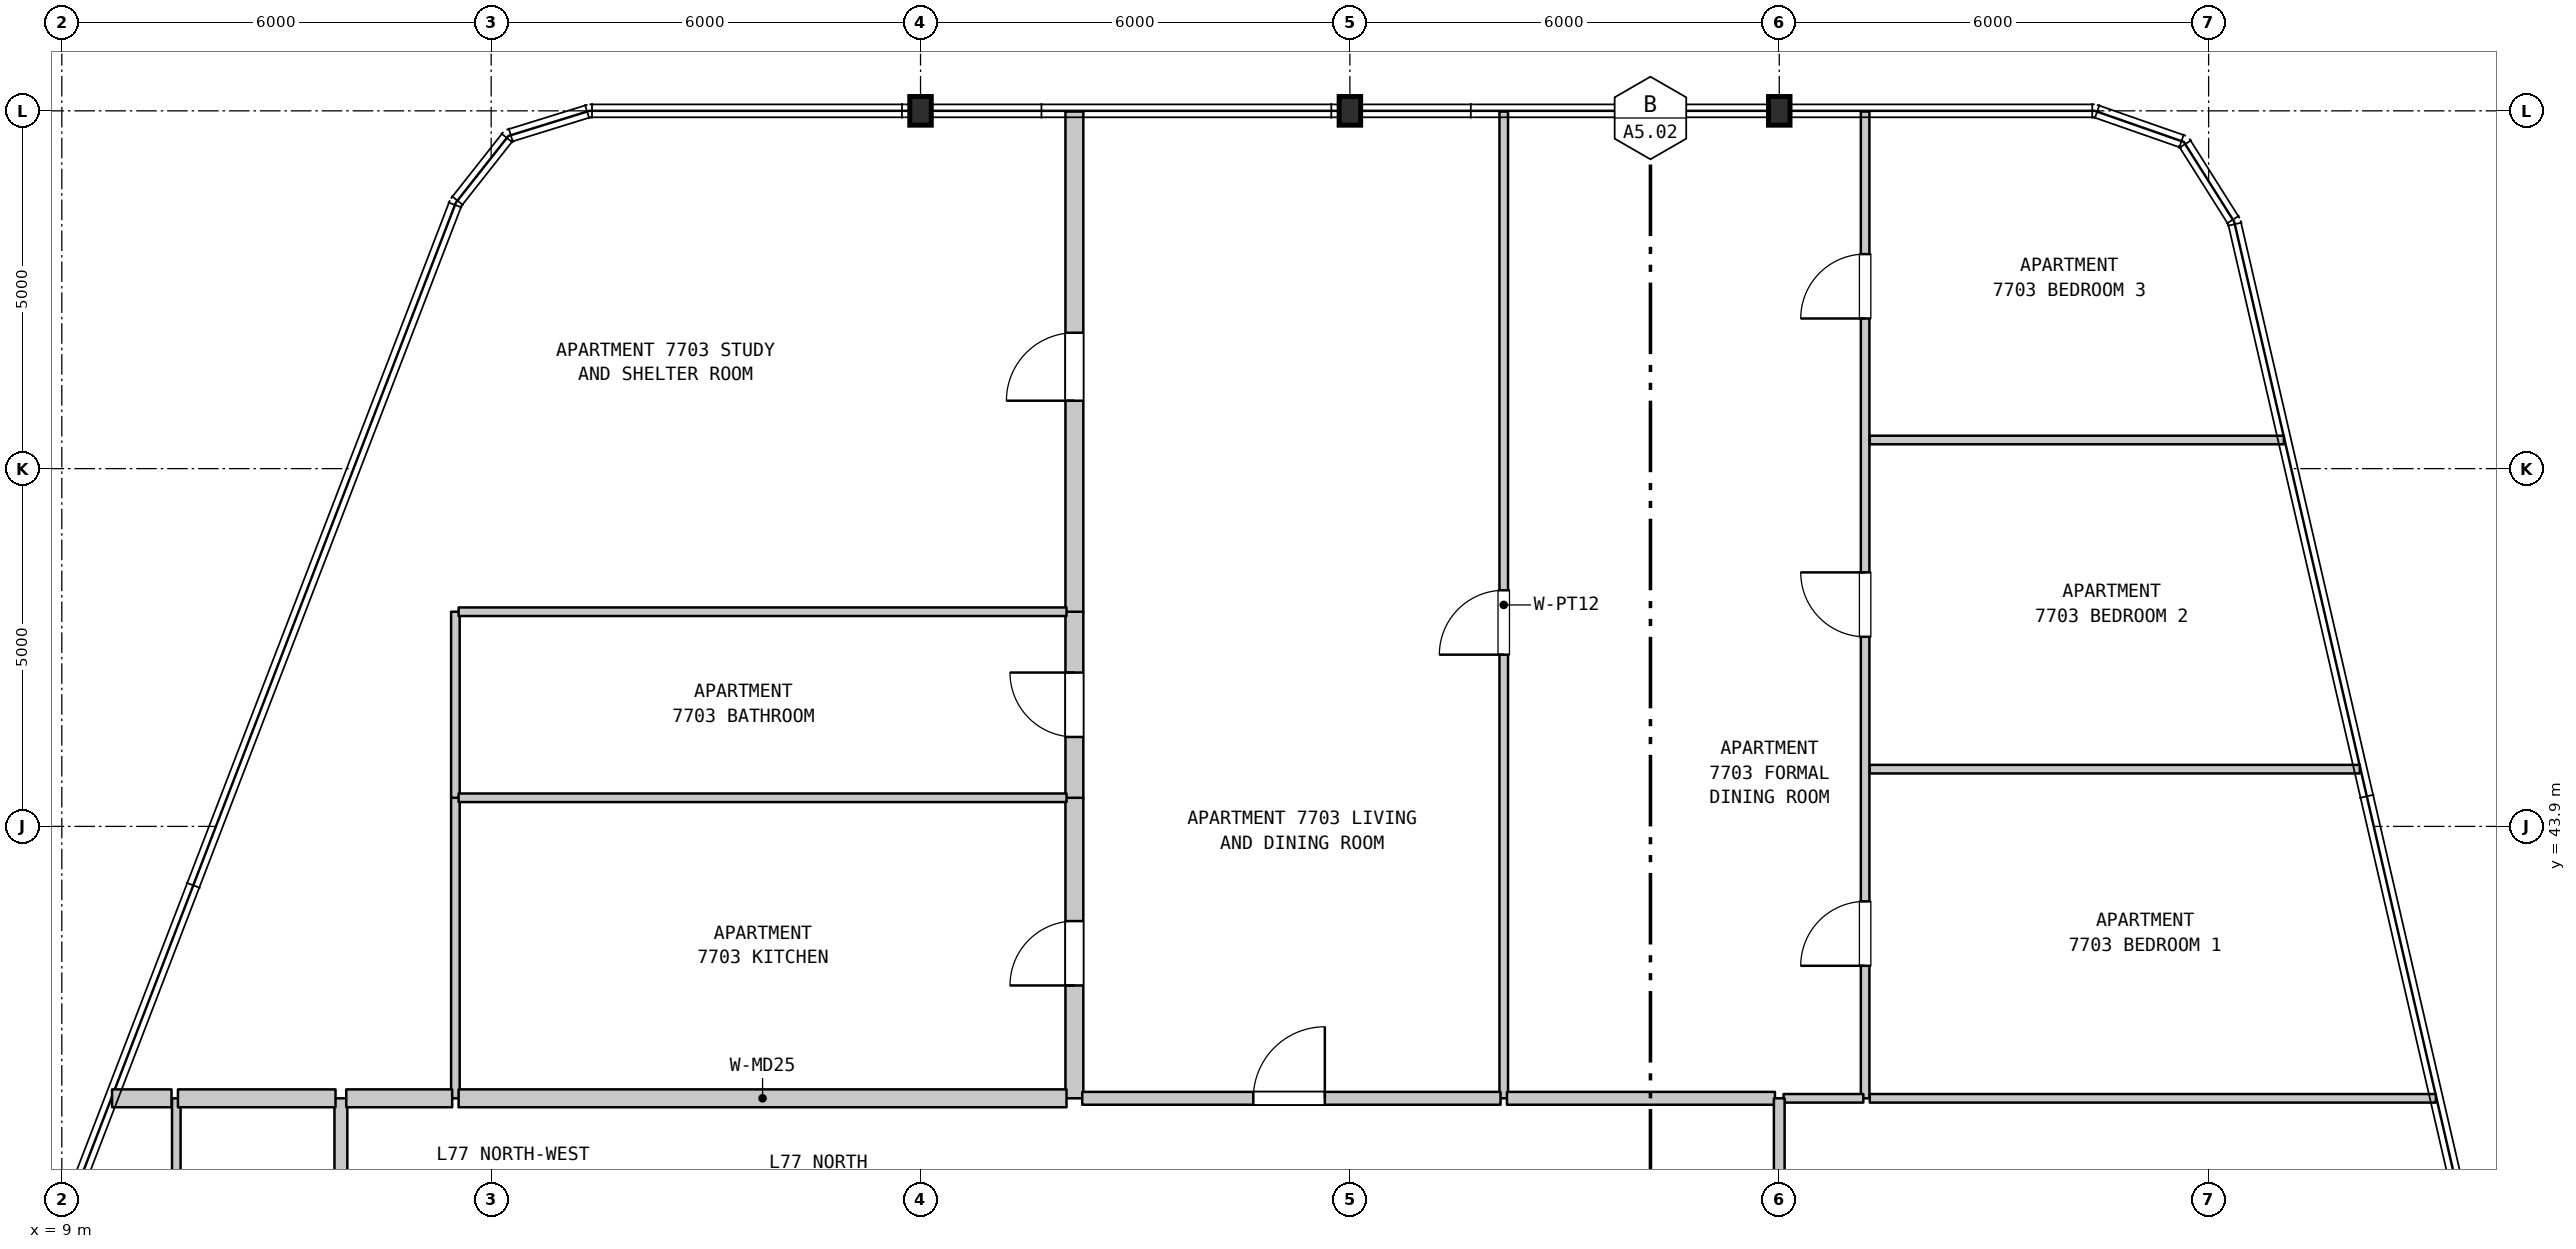
"""IFC4 building model, lengths in metres.
Left out: names, types, materials, properties, quantities, classifications, styles, units other than length and angle.
Written with IfcOpenShell. Run it as: python <this file> out.ifc"""

import sys

from ifc_helpers import new_model, si_unit, direction, frame, frame_2d, origin, origin_2d, place, context, subcontext, project, spatial, rectangle, i_section, extrude, element, fill, save


model = new_model("IFC4")
c1 = context("Model", 3, precision=1e-05, world=origin(), true_north=direction((0.0, 1.0)))
c2 = subcontext(c1, "Body", "Model", "MODEL_VIEW")
j1 = project(units=[si_unit("LENGTHUNIT", "METRE"), si_unit("PLANEANGLEUNIT", "RADIAN")], contexts=[c1])
p1 = place(None, origin())
s1 = spatial("IfcSite", under=j1, at=p1, CompositionType="ELEMENT")
p2 = place(p1, origin())
s2 = spatial("IfcBuilding", under=s1, at=p2, CompositionType="ELEMENT")
p3 = place(p2, frame((0.0, 0.0, 307.3)))
s3 = spatial("IfcBuildingStorey", under=s2, at=p3, CompositionType="ELEMENT", Elevation=307.3)
for number, where, z_axis, x_axis in (
    (1, (21.0, 53.9, 0.0), (0.0, 0.0, 1.0), (1.0, 0.0, 0.0)),
    (2, (27.0, 53.9, 0.0), (0.0, 0.0, 1.0), (1.0, 0.0, 0.0)),
    (3, (33.0, 53.9, 0.0), (0.0, 0.0, 1.0), (1.0, 0.0, 0.0)),
):
    element("IfcColumn", number, at=place(p3, frame(where, z_axis=z_axis, x_axis=x_axis)), inside=s3, PredefinedType="COLUMN", context=c2, shape_type="SweptSolid", body=[
        extrude(i_section(OverallWidth=0.3, OverallDepth=0.4, WebThickness=0.013, FlangeThickness=0.024, FilletRadius=0.027, at=origin_2d()), origin(), (0.0, 0.0, 1.0), 3.7),
    ])
p4 = place(p3, frame((10.6, 31.5, 0.0), z_axis=(0.0, 0.0, 1.0), x_axis=(0.0, 1.0, 0.0)))
e4 = element("IfcWall", 4, at=p4, inside=s3, PredefinedType="PARTITIONING", context=c2, shape_type="SweptSolid", body=[
    extrude(rectangle(XDim=8.6, YDim=0.12, at=frame_2d((4.3, 0.0))), origin(), (0.0, 0.0, 1.0), 3.39),
])
p5 = place(p3, frame((12.9, 31.5, 0.0), z_axis=(0.0, 0.0, 1.0), x_axis=(0.0, 1.0, 0.0)))
e5 = element("IfcWall", 5, at=p5, inside=s3, PredefinedType="STANDARD", context=c2, shape_type="SweptSolid", body=[
    extrude(rectangle(XDim=8.6, YDim=0.18, at=frame_2d((4.3, 0.0))), origin(), (0.0, 0.0, 1.0), 3.39),
])
p6 = place(p3, frame((14.5, 40.1, 0.0), z_axis=(0.0, 0.0, 1.0), x_axis=(0.0, 1.0, 0.0)))
e6 = element("IfcWall", 6, at=p6, inside=s3, PredefinedType="PARTITIONING", context=c2, shape_type="SweptSolid", body=[
    extrude(rectangle(XDim=4.2, YDim=0.12, at=frame_2d((2.1, 0.0))), origin(), (0.0, 0.0, 1.0), 3.39),
])
p7 = place(p3, frame((14.5, 44.3, 0.0), z_axis=(0.0, 0.0, 1.0), x_axis=(0.0, 1.0, 0.0)))
e7 = element("IfcWall", 7, at=p7, inside=s3, PredefinedType="PARTITIONING", context=c2, shape_type="SweptSolid", body=[
    extrude(rectangle(XDim=2.6, YDim=0.12, at=frame_2d((1.3, 0.0))), origin(), (0.0, 0.0, 1.0), 3.39),
])
p8 = place(p3, frame((23.15, 40.1, 0.0), z_axis=(0.0, 0.0, 1.0), x_axis=(0.0, 1.0, 0.0)))
e8 = element("IfcWall", 8, at=p8, inside=s3, PredefinedType="STANDARD", context=c2, shape_type="SweptSolid", body=[
    extrude(rectangle(XDim=4.2, YDim=0.25, at=frame_2d((2.1, 0.0))), origin(), (0.0, 0.0, 1.0), 3.39),
])
p9 = place(p8, frame((1.577, 0.0, 0.0)))
e9 = element("IfcOpeningElement", 9, at=p9, cuts=e8, PredefinedType="OPENING", context=c2, shape_type="SweptSolid", body=[
    extrude(rectangle(XDim=0.9, YDim=2.15, at=frame_2d((0.45, 1.075))), frame((0.0, 0.135, 0.0), z_axis=(0.0, -1.0, 0.0), x_axis=(1.0, 0.0, 0.0)), (0.0, 0.0, 1.0), 0.27),
])
p10 = place(p3, frame((23.15, 44.3, 0.0), z_axis=(0.0, 0.0, 1.0), x_axis=(0.0, 1.0, 0.0)))
e10 = element("IfcWall", 10, at=p10, inside=s3, PredefinedType="STANDARD", context=c2, shape_type="SweptSolid", body=[
    extrude(rectangle(XDim=2.6, YDim=0.25, at=frame_2d((1.3, 0.0))), origin(), (0.0, 0.0, 1.0), 3.39),
])
p11 = place(p10, frame((0.85, 0.0, 0.0)))
e11 = element("IfcOpeningElement", 11, at=p11, cuts=e10, PredefinedType="OPENING", context=c2, shape_type="SweptSolid", body=[
    extrude(rectangle(XDim=0.9, YDim=2.1, at=frame_2d((0.45, 1.05))), frame((0.0, 0.135, 0.0), z_axis=(0.0, -1.0, 0.0), x_axis=(1.0, 0.0, 0.0)), (0.0, 0.0, 1.0), 0.27),
])
p12 = place(p3, frame((23.15, 46.9, 0.0), z_axis=(0.0, 0.0, 1.0), x_axis=(0.0, 1.0, 0.0)))
e12 = element("IfcWall", 12, at=p12, inside=s3, PredefinedType="STANDARD", context=c2, shape_type="SweptSolid", body=[
    extrude(rectangle(XDim=6.99, YDim=0.25, at=frame_2d((3.495, 0.0))), origin(), (0.0, 0.0, 1.0), 3.39),
])
p13 = place(p12, frame((2.949, 0.0, 0.0)))
e13 = element("IfcOpeningElement", 13, at=p13, cuts=e12, PredefinedType="OPENING", context=c2, shape_type="SweptSolid", body=[
    extrude(rectangle(XDim=0.95, YDim=2.15, at=frame_2d((0.475, 1.075))), frame((0.0, 0.135, 0.0), z_axis=(0.0, -1.0, 0.0), x_axis=(1.0, 0.0, 0.0)), (0.0, 0.0, 1.0), 0.27),
])
p14 = place(p3, frame((29.15, 40.1, 0.0), z_axis=(0.0, 0.0, 1.0), x_axis=(0.0, 1.0, 0.0)))
e14 = element("IfcWall", 14, at=p14, inside=s3, PredefinedType="PARTITIONING", context=c2, shape_type="SweptSolid", body=[
    extrude(rectangle(XDim=13.79, YDim=0.12, at=frame_2d((6.895, 0.0))), origin(), (0.0, 0.0, 1.0), 3.39),
])
p15 = place(p14, frame((6.2, 0.0, 0.0)))
e15 = element("IfcOpeningElement", 15, at=p15, cuts=e14, PredefinedType="OPENING", context=c2, shape_type="SweptSolid", body=[
    extrude(rectangle(XDim=0.9, YDim=2.15, at=frame_2d((0.45, 1.075))), frame((0.0, 0.07, 0.0), z_axis=(0.0, -1.0, 0.0), x_axis=(1.0, 0.0, 0.0)), (0.0, 0.0, 1.0), 0.14),
])
p16 = place(p3, frame((34.2, 40.1, 0.0), z_axis=(0.0, 0.0, 1.0), x_axis=(0.0, 1.0, 0.0)))
e16 = element("IfcWall", 16, at=p16, inside=s3, PredefinedType="PARTITIONING", context=c2, shape_type="SweptSolid", body=[
    extrude(rectangle(XDim=13.79, YDim=0.12, at=frame_2d((6.895, 0.0))), origin(), (0.0, 0.0, 1.0), 3.39),
])
p17 = place(p16, frame((1.852, 0.0, 0.0)))
e17 = element("IfcOpeningElement", 17, at=p17, cuts=e16, PredefinedType="OPENING", context=c2, shape_type="SweptSolid", body=[
    extrude(rectangle(XDim=0.9, YDim=2.15, at=frame_2d((0.45, 1.075))), frame((0.0, 0.07, 0.0), z_axis=(0.0, -1.0, 0.0), x_axis=(1.0, 0.0, 0.0)), (0.0, 0.0, 1.0), 0.14),
])
p18 = place(p16, frame((6.45, 0.0, 0.0)))
e18 = element("IfcOpeningElement", 18, at=p18, cuts=e16, PredefinedType="OPENING", context=c2, shape_type="SweptSolid", body=[
    extrude(rectangle(XDim=0.9, YDim=2.15, at=frame_2d((0.45, 1.075))), frame((0.0, 0.07, 0.0), z_axis=(0.0, -1.0, 0.0), x_axis=(1.0, 0.0, 0.0)), (0.0, 0.0, 1.0), 0.14),
])
p19 = place(p16, frame((10.898, 0.0, 0.0)))
e19 = element("IfcOpeningElement", 19, at=p19, cuts=e16, PredefinedType="OPENING", context=c2, shape_type="SweptSolid", body=[
    extrude(rectangle(XDim=0.9, YDim=2.15, at=frame_2d((0.45, 1.075))), frame((0.0, 0.07, 0.0), z_axis=(0.0, -1.0, 0.0), x_axis=(1.0, 0.0, 0.0)), (0.0, 0.0, 1.0), 0.14),
])
p20 = place(p3, frame((9.702, 40.1, 0.0), z_axis=(0.0, 0.0, 1.0), x_axis=(1.0, 0.0, 0.0)))
e20 = element("IfcWall", 20, at=p20, inside=s3, PredefinedType="STANDARD", context=c2, shape_type="SweptSolid", body=[
    extrude(rectangle(XDim=0.831, YDim=0.25, at=frame_2d((0.416, 0.0))), origin(), (0.0, 0.0, 1.0), 3.39),
])
p21 = place(p3, frame((10.623, 40.1, 0.0), z_axis=(0.0, 0.0, 1.0), x_axis=(1.0, 0.0, 0.0)))
e21 = element("IfcWall", 21, at=p21, inside=s3, PredefinedType="STANDARD", context=c2, shape_type="SweptSolid", body=[
    extrude(rectangle(XDim=2.202, YDim=0.25, at=frame_2d((1.101, 0.0))), origin(), (0.0, 0.0, 1.0), 3.39),
])
p22 = place(p3, frame((12.975, 40.1, 0.0), z_axis=(0.0, 0.0, 1.0), x_axis=(1.0, 0.0, 0.0)))
e22 = element("IfcWall", 22, at=p22, inside=s3, PredefinedType="STANDARD", context=c2, shape_type="SweptSolid", body=[
    extrude(rectangle(XDim=1.48, YDim=0.25, at=frame_2d((0.74, 0.0))), origin(), (0.0, 0.0, 1.0), 3.39),
])
p23 = place(p3, frame((14.545, 40.1, 0.0), z_axis=(0.0, 0.0, 1.0), x_axis=(1.0, 0.0, 0.0)))
e23 = element("IfcWall", 23, at=p23, inside=s3, PredefinedType="STANDARD", context=c2, shape_type="SweptSolid", body=[
    extrude(rectangle(XDim=8.495, YDim=0.25, at=frame_2d((4.248, 0.0))), origin(), (0.0, 0.0, 1.0), 3.39),
])
p24 = place(p3, frame((23.26, 40.1, 0.0), z_axis=(0.0, 0.0, 1.0), x_axis=(1.0, 0.0, 0.0)))
e24 = element("IfcWall", 24, at=p24, inside=s3, PredefinedType="STANDARD", context=c2, shape_type="SweptSolid", body=[
    extrude(rectangle(XDim=5.845, YDim=0.18, at=frame_2d((2.922, 0.0))), origin(), (0.0, 0.0, 1.0), 3.39),
])
p25 = place(p24, frame((2.39, 0.0, 0.0)))
e25 = element("IfcOpeningElement", 25, at=p25, cuts=e24, PredefinedType="OPENING", context=c2, shape_type="SweptSolid", body=[
    extrude(rectangle(XDim=1.0, YDim=2.15, at=frame_2d((0.5, 1.075))), frame((0.0, 0.1, 0.0), z_axis=(0.0, -1.0, 0.0), x_axis=(1.0, 0.0, 0.0)), (0.0, 0.0, 1.0), 0.2),
])
p26 = place(p3, frame((29.195, 40.1, 0.0), z_axis=(0.0, 0.0, 1.0), x_axis=(1.0, 0.0, 0.0)))
e26 = element("IfcWall", 26, at=p26, inside=s3, PredefinedType="STANDARD", context=c2, shape_type="SweptSolid", body=[
    extrude(rectangle(XDim=3.745, YDim=0.18, at=frame_2d((1.873, 0.0))), origin(), (0.0, 0.0, 1.0), 3.39),
])
p27 = place(p3, frame((33.06, 40.1, 0.0), z_axis=(0.0, 0.0, 1.0), x_axis=(1.0, 0.0, 0.0)))
e27 = element("IfcWall", 27, at=p27, inside=s3, PredefinedType="PARTITIONING", context=c2, shape_type="SweptSolid", body=[
    extrude(rectangle(XDim=1.115, YDim=0.12, at=frame_2d((0.558, 0.0))), origin(), (0.0, 0.0, 1.0), 3.39),
])
p28 = place(p3, frame((34.265, 40.1, 0.0), z_axis=(0.0, 0.0, 1.0), x_axis=(1.0, 0.0, 0.0)))
e28 = element("IfcWall", 28, at=p28, inside=s3, PredefinedType="PARTITIONING", context=c2, shape_type="SweptSolid", body=[
    extrude(rectangle(XDim=7.91, YDim=0.12, at=frame_2d((3.955, 0.0))), origin(), (0.0, 0.0, 1.0), 3.39),
])
p29 = place(p3, frame((14.545, 44.3, 0.0), z_axis=(0.0, 0.0, 1.0), x_axis=(1.0, 0.0, 0.0)))
e29 = element("IfcWall", 29, at=p29, inside=s3, PredefinedType="PARTITIONING", context=c2, shape_type="SweptSolid", body=[
    extrude(rectangle(XDim=8.495, YDim=0.12, at=frame_2d((4.248, 0.0))), origin(), (0.0, 0.0, 1.0), 3.39),
])
p30 = place(p3, frame((34.265, 44.7, 0.0), z_axis=(0.0, 0.0, 1.0), x_axis=(1.0, 0.0, 0.0)))
e30 = element("IfcWall", 30, at=p30, inside=s3, PredefinedType="PARTITIONING", context=c2, shape_type="SweptSolid", body=[
    extrude(rectangle(XDim=6.848, YDim=0.12, at=frame_2d((3.424, 0.0))), origin(), (0.0, 0.0, 1.0), 3.39),
])
p31 = place(p3, frame((14.545, 46.9, 0.0), z_axis=(0.0, 0.0, 1.0), x_axis=(1.0, 0.0, 0.0)))
e31 = element("IfcWall", 31, at=p31, inside=s3, PredefinedType="PARTITIONING", context=c2, shape_type="SweptSolid", body=[
    extrude(rectangle(XDim=8.495, YDim=0.12, at=frame_2d((4.248, 0.0))), origin(), (0.0, 0.0, 1.0), 3.39),
])
p32 = place(p3, frame((34.265, 49.3, 0.0), z_axis=(0.0, 0.0, 1.0), x_axis=(1.0, 0.0, 0.0)))
e32 = element("IfcWall", 32, at=p32, inside=s3, PredefinedType="PARTITIONING", context=c2, shape_type="SweptSolid", body=[
    extrude(rectangle(XDim=5.787, YDim=0.12, at=frame_2d((2.894, 0.0))), origin(), (0.0, 0.0, 1.0), 3.39),
])
p33 = place(p3, frame((33.0, 37.9, 0.0), z_axis=(0.0, 0.0, 1.0), x_axis=(0.0, 1.0, 0.0)))
e33 = element("IfcWall", 33, at=p33, inside=s3, PredefinedType="STANDARD", context=c2, shape_type="SweptSolid", body=[
    extrude(rectangle(XDim=2.2, YDim=0.15, at=frame_2d((1.1, 0.0))), origin(), (0.0, 0.0, 1.0), 2.79),
])
p34 = place(p9, origin())
e34 = element("IfcDoor", 34, at=p34, inside=s3, OperationType="SINGLE_SWING_LEFT", PredefinedType="DOOR", context=c2, shape_type="SweptSolid", body=[
    extrude(rectangle(XDim=0.9, YDim=2.15, at=frame_2d((0.45, 1.075))), frame((0.0, 0.025, 0.0), z_axis=(0.0, -1.0, 0.0), x_axis=(1.0, 0.0, 0.0)), (0.0, 0.0, 1.0), 0.05),
])
fill(e9, e34)
p35 = place(p11, origin())
e35 = element("IfcDoor", 35, at=p35, inside=s3, OperationType="SINGLE_SWING_RIGHT", PredefinedType="DOOR", context=c2, shape_type="SweptSolid", body=[
    extrude(rectangle(XDim=0.9, YDim=2.1, at=frame_2d((0.45, 1.05))), frame((0.0, 0.025, 0.0), z_axis=(0.0, -1.0, 0.0), x_axis=(1.0, 0.0, 0.0)), (0.0, 0.0, 1.0), 0.05),
])
fill(e11, e35)
p36 = place(p13, origin())
e36 = element("IfcDoor", 36, at=p36, inside=s3, OperationType="SINGLE_SWING_LEFT", PredefinedType="DOOR", context=c2, shape_type="SweptSolid", body=[
    extrude(rectangle(XDim=0.95, YDim=2.15, at=frame_2d((0.475, 1.075))), frame((0.0, 0.025, 0.0), z_axis=(0.0, -1.0, 0.0), x_axis=(1.0, 0.0, 0.0)), (0.0, 0.0, 1.0), 0.05),
])
fill(e13, e36)
p37 = place(p15, origin())
e37 = element("IfcDoor", 37, at=p37, inside=s3, OperationType="SINGLE_SWING_LEFT", PredefinedType="DOOR", context=c2, shape_type="SweptSolid", body=[
    extrude(rectangle(XDim=0.9, YDim=2.15, at=frame_2d((0.45, 1.075))), frame((0.0, 0.025, 0.0), z_axis=(0.0, -1.0, 0.0), x_axis=(1.0, 0.0, 0.0)), (0.0, 0.0, 1.0), 0.05),
])
fill(e15, e37)
p38 = place(p17, origin())
e38 = element("IfcDoor", 38, at=p38, inside=s3, OperationType="SINGLE_SWING_LEFT", PredefinedType="DOOR", context=c2, shape_type="SweptSolid", body=[
    extrude(rectangle(XDim=0.9, YDim=2.15, at=frame_2d((0.45, 1.075))), frame((0.0, 0.025, 0.0), z_axis=(0.0, -1.0, 0.0), x_axis=(1.0, 0.0, 0.0)), (0.0, 0.0, 1.0), 0.05),
])
fill(e17, e38)
p39 = place(p18, origin())
e39 = element("IfcDoor", 39, at=p39, inside=s3, OperationType="SINGLE_SWING_RIGHT", PredefinedType="DOOR", context=c2, shape_type="SweptSolid", body=[
    extrude(rectangle(XDim=0.9, YDim=2.15, at=frame_2d((0.45, 1.075))), frame((0.0, 0.025, 0.0), z_axis=(0.0, -1.0, 0.0), x_axis=(1.0, 0.0, 0.0)), (0.0, 0.0, 1.0), 0.05),
])
fill(e18, e39)
p40 = place(p19, origin())
e40 = element("IfcDoor", 40, at=p40, inside=s3, OperationType="SINGLE_SWING_LEFT", PredefinedType="DOOR", context=c2, shape_type="SweptSolid", body=[
    extrude(rectangle(XDim=0.9, YDim=2.15, at=frame_2d((0.45, 1.075))), frame((0.0, 0.025, 0.0), z_axis=(0.0, -1.0, 0.0), x_axis=(1.0, 0.0, 0.0)), (0.0, 0.0, 1.0), 0.05),
])
fill(e19, e40)
p41 = place(p25, origin())
e41 = element("IfcDoor", 41, at=p41, inside=s3, OperationType="SINGLE_SWING_RIGHT", PredefinedType="DOOR", context=c2, shape_type="SweptSolid", body=[
    extrude(rectangle(XDim=1.0, YDim=2.15, at=frame_2d((0.5, 1.075))), frame((0.0, 0.025, 0.0), z_axis=(0.0, -1.0, 0.0), x_axis=(1.0, 0.0, 0.0)), (0.0, 0.0, 1.0), 0.05),
])
fill(e25, e41)
save(model, sys.argv[1])
